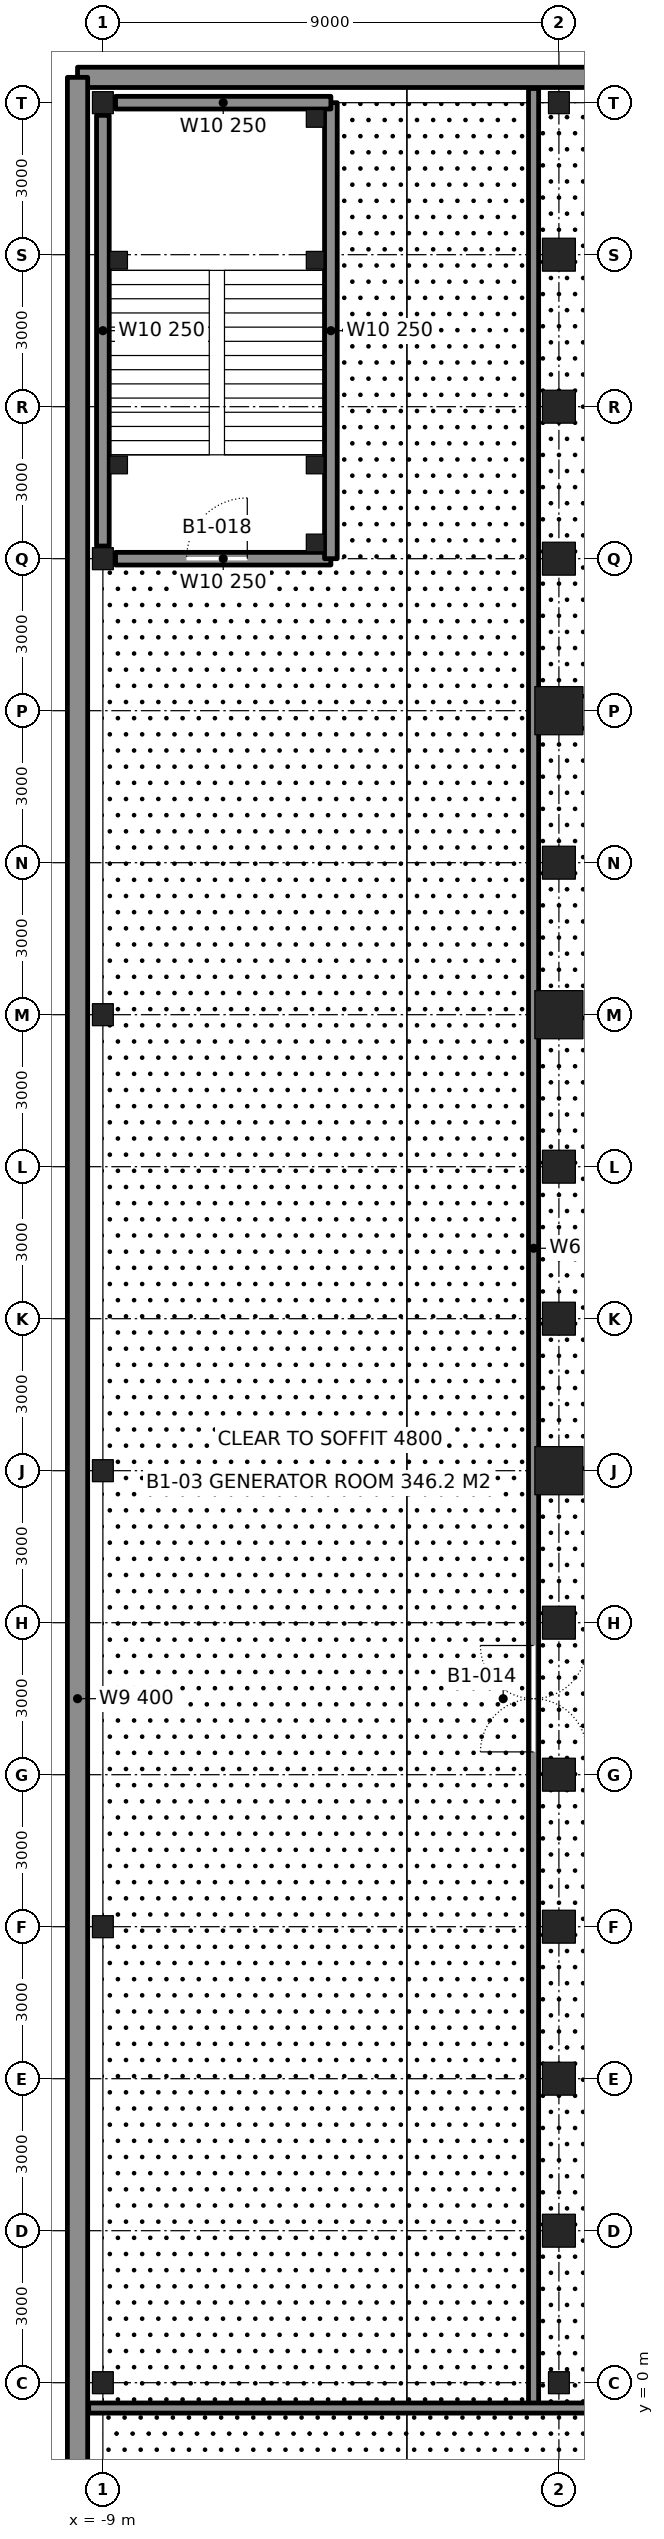
"""IFC4 building model, lengths in metres.
Left out: names, types, materials, properties, quantities, classifications, styles, units other than length and angle.
Written with IfcOpenShell. Run it as: python <this file> out.ifc"""

import sys

from ifc_helpers import new_model, si_unit, direction, frame, frame_2d, origin, origin_2d, place, context, subcontext, project, spatial, rectangle, hollow_rectangle, i_section, extrude, element, fill, save


model = new_model("IFC4")
c1 = context("Model", 3, precision=1e-05, world=origin(), true_north=direction((0.0, 1.0)))
c2 = subcontext(c1, "Body", "Model", "MODEL_VIEW")
j1 = project(units=[si_unit("LENGTHUNIT", "METRE"), si_unit("PLANEANGLEUNIT", "RADIAN")], contexts=[c1])
p1 = place(None, origin())
s1 = spatial("IfcSite", under=j1, at=p1, CompositionType="ELEMENT")
p2 = place(p1, origin())
s2 = spatial("IfcBuilding", under=s1, at=p2, CompositionType="ELEMENT")
p3 = place(p2, frame((0.0, 0.0, -5.0)))
s3 = spatial("IfcBuildingStorey", under=s2, at=p3, CompositionType="ELEMENT", Elevation=-5.0)
for number, where, z_axis, x_axis in (
    (1, (0.0, 42.0, -0.3), (0.0, 0.0, 1.0), (-1.0, 0.0, 0.0)),
    (2, (0.0, 39.0, -0.3), (0.0, 0.0, 1.0), (-1.0, 0.0, 0.0)),
    (3, (0.0, 36.0, -0.3), (0.0, 0.0, 1.0), (-1.0, 0.0, 0.0)),
):
    element("IfcColumn", number, at=place(p3, frame(where, z_axis=z_axis, x_axis=x_axis)), inside=s3, PredefinedType="COLUMN", context=c2, shape_type="SweptSolid", body=[
        extrude(hollow_rectangle(XDim=0.65, YDim=0.65, WallThickness=0.065, at=origin_2d()), origin(), (0.0, 0.0, 1.0), 5.3),
    ])
p4 = place(p3, frame((0.0, 33.0, -0.3), z_axis=(0.0, 0.0, 1.0), x_axis=(-1.0, 0.0, 0.0)))
e4 = element("IfcColumn", 4, at=p4, inside=s3, PredefinedType="COLUMN", context=c2, shape_type="SweptSolid", body=[
    extrude(hollow_rectangle(XDim=0.95, YDim=0.95, WallThickness=0.11, at=origin_2d()), origin(), (0.0, 0.0, 1.0), 5.3),
])
p5 = place(p3, frame((0.0, 30.0, -0.3), z_axis=(0.0, 0.0, 1.0), x_axis=(-1.0, 0.0, 0.0)))
e5 = element("IfcColumn", 5, at=p5, inside=s3, PredefinedType="COLUMN", context=c2, shape_type="SweptSolid", body=[
    extrude(hollow_rectangle(XDim=0.65, YDim=0.65, WallThickness=0.065, at=origin_2d()), origin(), (0.0, 0.0, 1.0), 5.3),
])
p6 = place(p3, frame((0.0, 27.0, -0.3), z_axis=(0.0, 0.0, 1.0), x_axis=(-1.0, 0.0, 0.0)))
e6 = element("IfcColumn", 6, at=p6, inside=s3, PredefinedType="COLUMN", context=c2, shape_type="SweptSolid", body=[
    extrude(hollow_rectangle(XDim=0.95, YDim=0.95, WallThickness=0.11, at=origin_2d()), origin(), (0.0, 0.0, 1.0), 5.3),
])
for number, where, z_axis, x_axis in (
    (7, (0.0, 24.0, -0.3), (0.0, 0.0, 1.0), (-1.0, 0.0, 0.0)),
    (8, (0.0, 21.0, -0.3), (0.0, 0.0, 1.0), (-1.0, 0.0, 0.0)),
):
    element("IfcColumn", number, at=place(p3, frame(where, z_axis=z_axis, x_axis=x_axis)), inside=s3, PredefinedType="COLUMN", context=c2, shape_type="SweptSolid", body=[
        extrude(hollow_rectangle(XDim=0.65, YDim=0.65, WallThickness=0.065, at=origin_2d()), origin(), (0.0, 0.0, 1.0), 5.3),
    ])
p7 = place(p3, frame((0.0, 18.0, -0.3), z_axis=(0.0, 0.0, 1.0), x_axis=(-1.0, 0.0, 0.0)))
e9 = element("IfcColumn", 9, at=p7, inside=s3, PredefinedType="COLUMN", context=c2, shape_type="SweptSolid", body=[
    extrude(hollow_rectangle(XDim=0.95, YDim=0.95, WallThickness=0.11, at=origin_2d()), origin(), (0.0, 0.0, 1.0), 5.3),
])
for number, where, z_axis, x_axis in (
    (10, (0.0, 15.0, -0.3), (0.0, 0.0, 1.0), (-1.0, 0.0, 0.0)),
    (11, (0.0, 12.0, -0.3), (0.0, 0.0, 1.0), (-1.0, 0.0, 0.0)),
    (12, (0.0, 9.0, -0.3), (0.0, 0.0, 1.0), (-1.0, 0.0, 0.0)),
    (13, (0.0, 6.0, -0.3), (0.0, 0.0, 1.0), (-1.0, 0.0, 0.0)),
    (14, (0.0, 3.0, -0.3), (0.0, 0.0, 1.0), (-1.0, 0.0, 0.0)),
):
    element("IfcColumn", number, at=place(p3, frame(where, z_axis=z_axis, x_axis=x_axis)), inside=s3, PredefinedType="COLUMN", context=c2, shape_type="SweptSolid", body=[
        extrude(hollow_rectangle(XDim=0.65, YDim=0.65, WallThickness=0.065, at=origin_2d()), origin(), (0.0, 0.0, 1.0), 5.3),
    ])
for number, where, z_axis, x_axis in (
    (15, (-9.0, 0.0, -0.3), (0.0, 0.0, 1.0), (1.0, 0.0, 0.0)),
    (16, (-9.0, 9.0, -0.3), (0.0, 0.0, 1.0), (1.0, 0.0, 0.0)),
    (17, (-9.0, 18.0, -0.3), (0.0, 0.0, 1.0), (1.0, 0.0, 0.0)),
    (18, (-9.0, 27.0, -0.3), (0.0, 0.0, 1.0), (1.0, 0.0, 0.0)),
    (19, (-9.0, 36.0, -0.3), (0.0, 0.0, 1.0), (1.0, 0.0, 0.0)),
    (20, (-9.0, 45.0, -0.3), (0.0, 0.0, 1.0), (1.0, 0.0, 0.0)),
    (21, (0.0, 0.0, -0.3), (0.0, 0.0, 1.0), (1.0, 0.0, 0.0)),
    (22, (0.0, 45.0, -0.3), (0.0, 0.0, 1.0), (1.0, 0.0, 0.0)),
):
    element("IfcColumn", number, at=place(p3, frame(where, z_axis=z_axis, x_axis=x_axis)), inside=s3, PredefinedType="COLUMN", context=c2, shape_type="SweptSolid", body=[
        extrude(i_section(OverallWidth=0.411, OverallDepth=0.434, WebThickness=0.036, FlangeThickness=0.057, at=origin_2d()), origin(), (0.0, 0.0, 1.0), 5.3),
    ])
for number, where, z_axis, x_axis in (
    (23, (54.5, 45.5, -0.3), (0.0, 0.0, 1.0), (-1.0, 0.0, 0.0)),
    (24, (-9.5, 45.5, -0.3), (0.0, 0.0, 1.0), (0.0, -1.0, 0.0)),
):
    element("IfcWall", number, at=place(p3, frame(where, z_axis=z_axis, x_axis=x_axis)), inside=s3, PredefinedType="USERDEFINED", context=c2, shape_type="SweptSolid", body=[
        extrude(rectangle(XDim=64.0, YDim=0.4, at=frame_2d((32.0, 0.0))), origin(), (0.0, 0.0, 1.0), 5.1),
    ])
p8 = place(p3, frame((-0.5, -0.5, 0.0), z_axis=(0.0, 0.0, 1.0), x_axis=(0.0, 1.0, 0.0)))
e25 = element("IfcWall", 25, at=p8, inside=s3, PredefinedType="PARTITIONING", context=c2, shape_type="SweptSolid", body=[
    extrude(rectangle(XDim=45.78, YDim=0.2, at=frame_2d((22.89, 0.0))), origin(), (0.0, 0.0, 1.0), 4.8),
])
p9 = place(p8, frame((12.95, 0.0, 0.0)))
e26 = element("IfcOpeningElement", 26, at=p9, cuts=e25, PredefinedType="OPENING", context=c2, shape_type="SweptSolid", body=[
    extrude(rectangle(XDim=2.1, YDim=2.4, at=frame_2d((1.05, 1.2))), frame((0.0, 0.11, 0.0), z_axis=(0.0, -1.0, 0.0), x_axis=(1.0, 0.0, 0.0)), (0.0, 0.0, 1.0), 0.22),
])
p10 = place(p3, frame((-9.28, -0.5, 0.0), z_axis=(0.0, 0.0, 1.0), x_axis=(1.0, 0.0, 0.0)))
e27 = element("IfcWall", 27, at=p10, inside=s3, PredefinedType="PARTITIONING", context=c2, shape_type="SweptSolid", body=[
    extrude(rectangle(XDim=63.56, YDim=0.2, at=frame_2d((31.78, 0.0))), origin(), (0.0, 0.0, 1.0), 4.8),
])
p11 = place(p10, frame((12.73, 0.0, 0.0)))
e28 = element("IfcOpeningElement", 28, at=p11, cuts=e27, PredefinedType="OPENING", context=c2, shape_type="SweptSolid", body=[
    extrude(rectangle(XDim=2.1, YDim=2.4, at=frame_2d((1.05, 1.2))), frame((0.0, 0.11, 0.0), z_axis=(0.0, -1.0, 0.0), x_axis=(1.0, 0.0, 0.0)), (0.0, 0.0, 1.0), 0.22),
])
p12 = place(p10, frame((48.73, 0.0, 0.0)))
e29 = element("IfcOpeningElement", 29, at=p12, cuts=e27, PredefinedType="OPENING", context=c2, shape_type="SweptSolid", body=[
    extrude(rectangle(XDim=2.1, YDim=2.4, at=frame_2d((1.05, 1.2))), frame((0.0, 0.11, 0.0), z_axis=(0.0, -1.0, 0.0), x_axis=(1.0, 0.0, 0.0)), (0.0, 0.0, 1.0), 0.22),
])
p13 = place(p3, frame((-8.75, 36.0, 0.0), z_axis=(0.0, 0.0, 1.0), x_axis=(1.0, 0.0, 0.0)))
e30 = element("IfcWall", 30, at=p13, inside=s3, PredefinedType="SOLIDWALL", context=c2, shape_type="SweptSolid", body=[
    extrude(rectangle(XDim=4.25, YDim=0.25, at=frame_2d((2.125, 0.0))), origin(), (0.0, 0.0, 1.0), 3.853),
])
p14 = place(p13, frame((1.4, 0.0, 0.0)))
e31 = element("IfcOpeningElement", 31, at=p14, cuts=e30, PredefinedType="OPENING", context=c2, shape_type="SweptSolid", body=[
    extrude(rectangle(XDim=1.2, YDim=2.1, at=frame_2d((0.6, 1.05))), frame((0.0, 0.135, 0.0), z_axis=(0.0, -1.0, 0.0), x_axis=(1.0, 0.0, 0.0)), (0.0, 0.0, 1.0), 0.27),
])
p15 = place(p3, frame((-4.5, 36.0, 0.0), z_axis=(0.0, 0.0, 1.0), x_axis=(0.0, 1.0, 0.0)))
e32 = element("IfcWall", 32, at=p15, inside=s3, PredefinedType="SOLIDWALL", context=c2, shape_type="SweptSolid", body=[
    extrude(rectangle(XDim=9.0, YDim=0.25, at=frame_2d((4.5, 0.0))), origin(), (0.0, 0.0, 1.0), 3.853),
])
p16 = place(p3, frame((-8.75, 45.0, 0.0), z_axis=(0.0, 0.0, 1.0), x_axis=(1.0, 0.0, 0.0)))
e33 = element("IfcWall", 33, at=p16, inside=s3, PredefinedType="SOLIDWALL", context=c2, shape_type="SweptSolid", body=[
    extrude(rectangle(XDim=4.25, YDim=0.25, at=frame_2d((2.125, 0.0))), origin(), (0.0, 0.0, 1.0), 3.853),
])
p17 = place(p3, frame((-9.0, 36.25, 0.0), z_axis=(0.0, 0.0, 1.0), x_axis=(0.0, 1.0, 0.0)))
e34 = element("IfcWall", 34, at=p17, inside=s3, PredefinedType="SOLIDWALL", context=c2, shape_type="SweptSolid", body=[
    extrude(rectangle(XDim=8.5, YDim=0.25, at=frame_2d((4.25, 0.0))), origin(), (0.0, 0.0, 1.0), 3.853),
])
for number, where, z_axis, x_axis in (
    (35, (-4.81, 44.69, -0.3), (0.0, 0.0, 1.0), (1.0, 0.0, 0.0)),
    (36, (-8.69, 41.89, -0.3), (0.0, 0.0, 1.0), (1.0, 0.0, 0.0)),
    (37, (-4.81, 41.89, -0.3), (0.0, 0.0, 1.0), (1.0, 0.0, 0.0)),
    (38, (-8.69, 37.85, -0.3), (0.0, 0.0, 1.0), (1.0, 0.0, 0.0)),
    (39, (-4.81, 37.85, -0.3), (0.0, 0.0, 1.0), (1.0, 0.0, 0.0)),
    (40, (-4.81, 36.31, -0.3), (0.0, 0.0, 1.0), (1.0, 0.0, 0.0)),
):
    element("IfcColumn", number, at=place(p3, frame(where, z_axis=z_axis, x_axis=x_axis)), inside=s3, PredefinedType="COLUMN", context=c2, shape_type="SweptSolid", body=[
        extrude(hollow_rectangle(XDim=0.35, YDim=0.35, WallThickness=0.035, at=origin_2d()), origin(), (0.0, 0.0, 1.0), 5.3),
    ])
p18 = place(p9, origin())
e41 = element("IfcDoor", 41, at=p18, inside=s3, OperationType="DOUBLE_DOOR_DOUBLE_SWING", PredefinedType="DOOR", context=c2, shape_type="SweptSolid", body=[
    extrude(rectangle(XDim=2.1, YDim=2.4, at=frame_2d((1.05, 1.2))), frame((0.0, 0.025, 0.0), z_axis=(0.0, -1.0, 0.0), x_axis=(1.0, 0.0, 0.0)), (0.0, 0.0, 1.0), 0.05),
])
fill(e26, e41)
p19 = place(p14, origin())
e42 = element("IfcDoor", 42, at=p19, inside=s3, OperationType="SINGLE_SWING_RIGHT", PredefinedType="DOOR", context=c2, shape_type="SweptSolid", body=[
    extrude(rectangle(XDim=1.2, YDim=2.1, at=frame_2d((0.6, 1.05))), frame((0.0, 0.025, 0.0), z_axis=(0.0, -1.0, 0.0), x_axis=(1.0, 0.0, 0.0)), (0.0, 0.0, 1.0), 0.05),
])
fill(e31, e42)
save(model, sys.argv[1])
